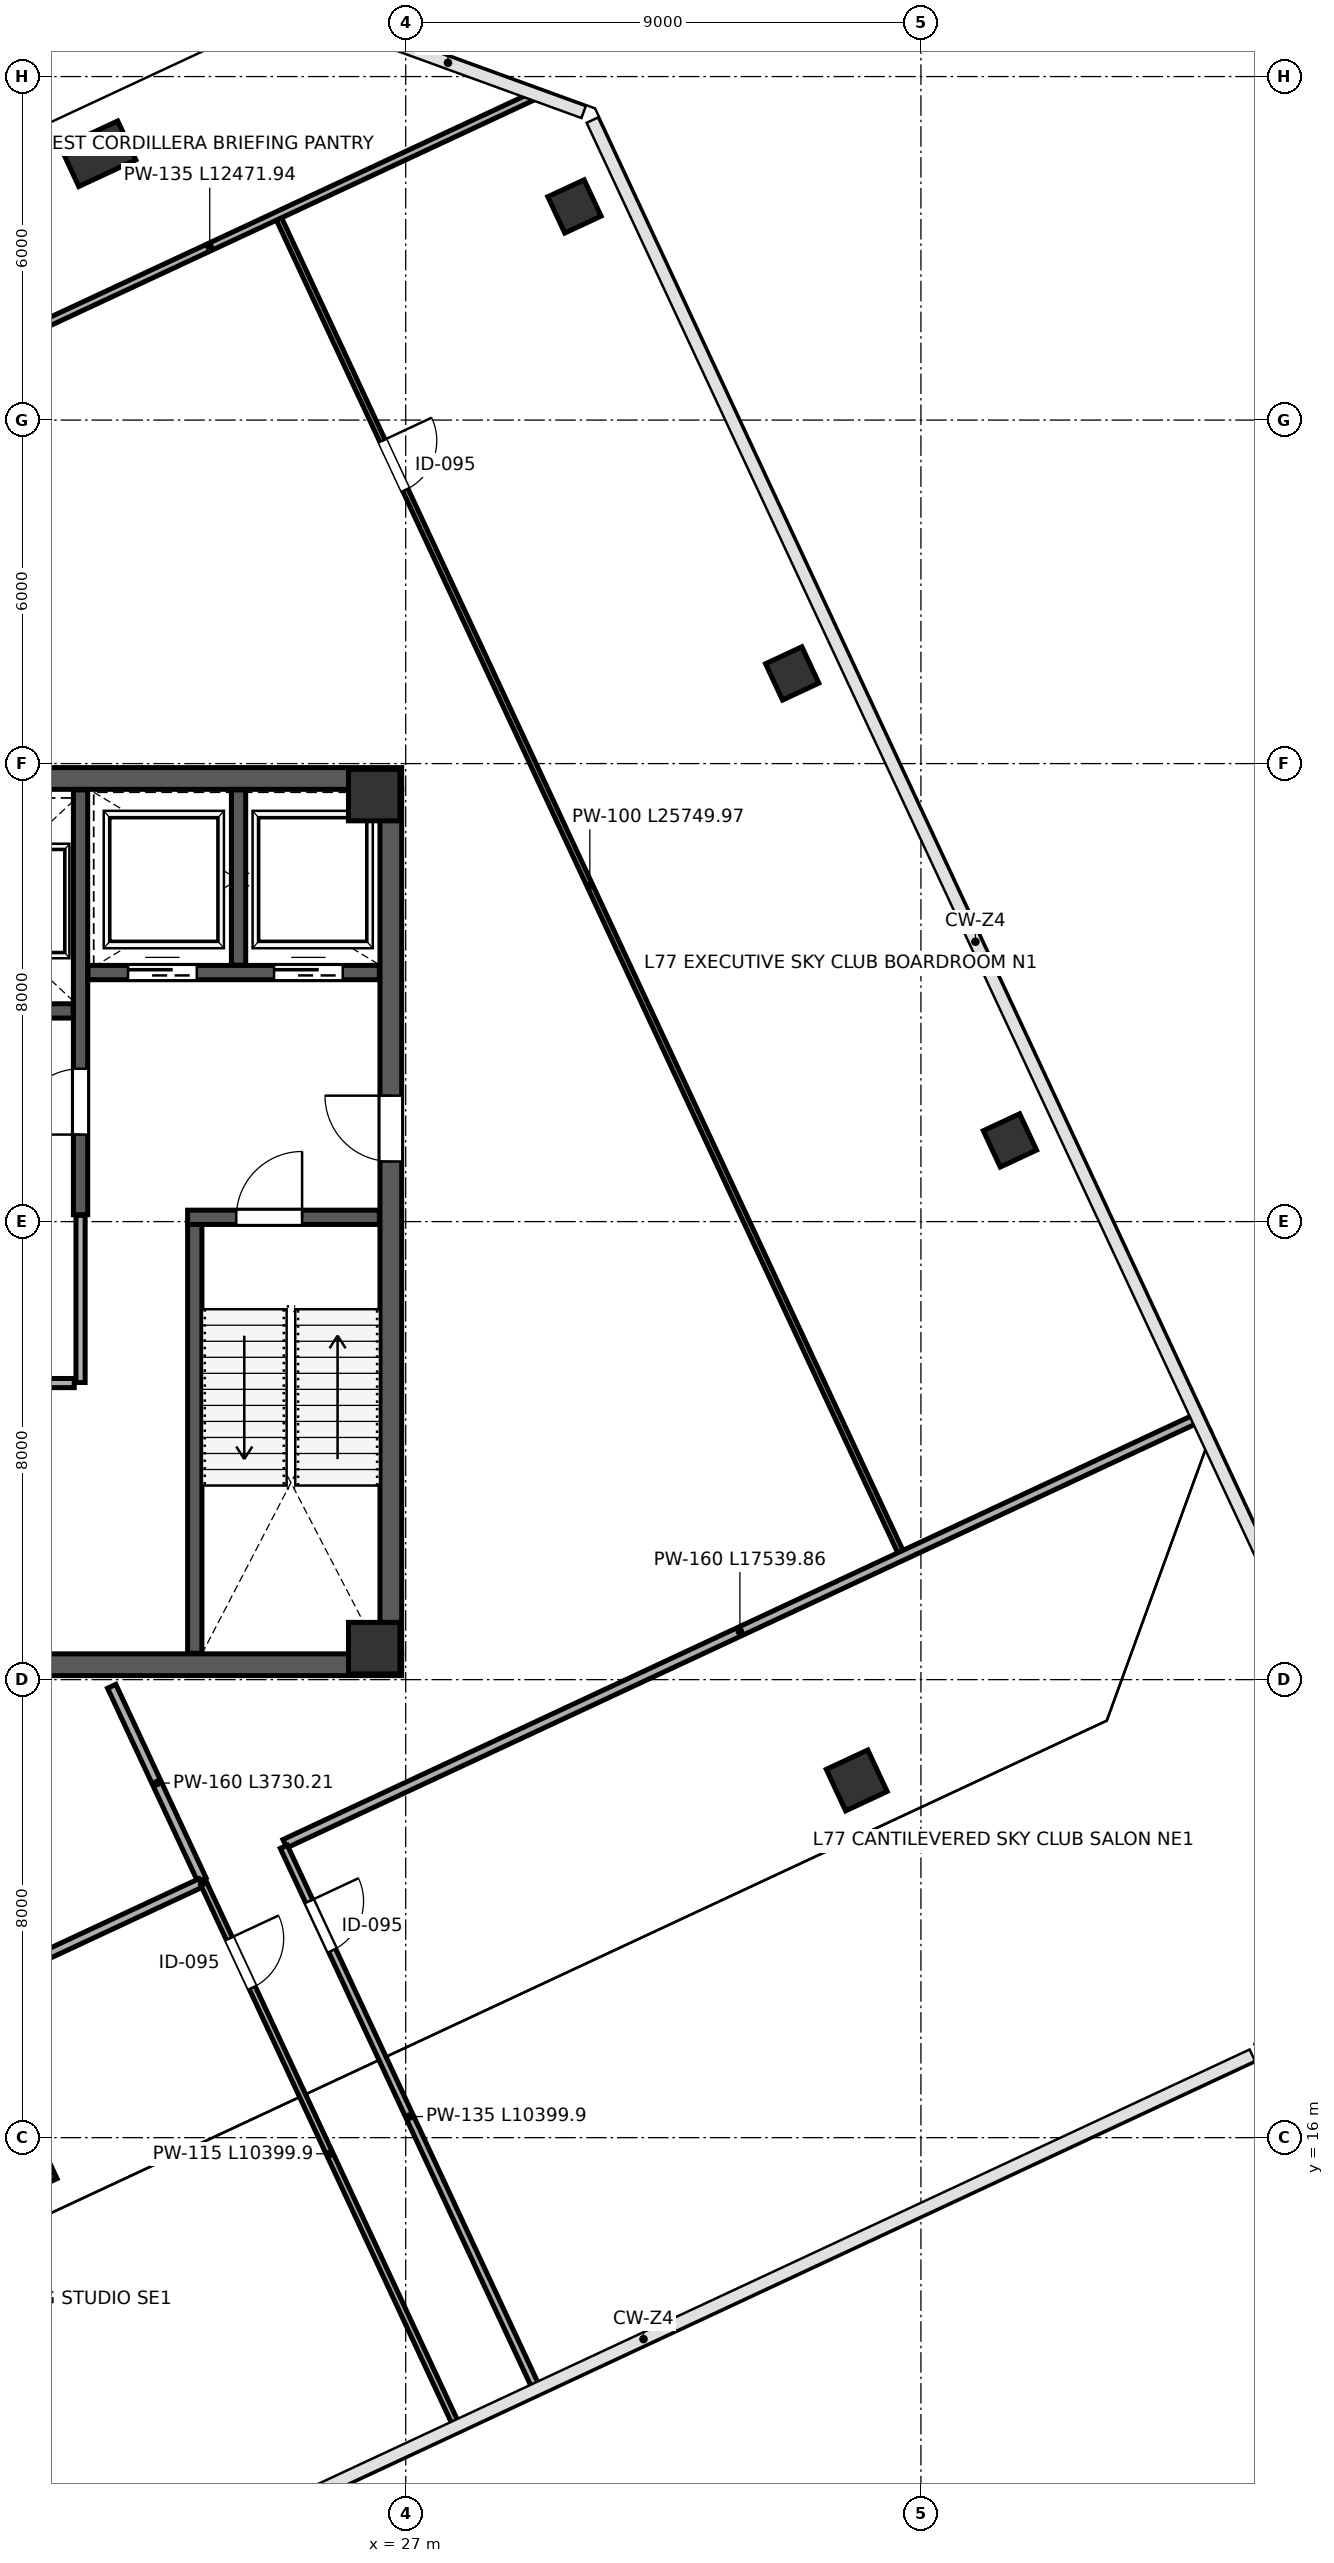
"""IFC4 building model, lengths in metres.
Left out: names, types, materials, properties, quantities, classifications, styles, units other than length and angle.
Written with IfcOpenShell. Run it as: python <this file> out.ifc"""

import sys

from ifc_helpers import new_model, si_unit, direction, frame, frame_2d, origin, origin_2d, place, context, subcontext, project, spatial, rectangle, extrude, source, transform, mapped, element, fill, save


model = new_model("IFC4")
c1 = context("Model", 3, precision=1e-05, world=origin(), true_north=direction((0.0, 1.0)))
c2 = subcontext(c1, "Body", "Model", "MODEL_VIEW")
j1 = project(units=[si_unit("LENGTHUNIT", "METRE"), si_unit("PLANEANGLEUNIT", "RADIAN")], contexts=[c1])
p1 = place(None, origin())
s1 = spatial("IfcSite", under=j1, at=p1, CompositionType="ELEMENT")
p2 = place(p1, origin())
s2 = spatial("IfcBuilding", under=s1, at=p2, CompositionType="ELEMENT")
p3 = place(p2, frame((0.0, 0.0, 340.8)))
s3 = spatial("IfcBuildingStorey", under=s2, at=p3, CompositionType="ELEMENT", Elevation=340.8)
m1 = source(origin(), c2, "Body", "SweptSolid", [
    extrude(rectangle(XDim=0.9, YDim=0.9, at=origin_2d()), origin(), (0.0, 0.0, 1.0), 4.198),
])
for number, where, z_axis, x_axis in (
    (1, (26.45, 24.55, 0.001), (0.0, 0.0, 1.0), (1.0, 0.0, 0.0)),
    (2, (26.45, 39.45, 0.001), (0.0, 0.0, 1.0), (1.0, 0.0, 0.0)),
):
    element("IfcColumn", number, at=place(p3, frame(where, z_axis=z_axis, x_axis=x_axis)), inside=s3, PredefinedType="COLUMN", context=c2, shape_type="MappedRepresentation", body=[
        mapped(m1, transform((0.0, 0.0, 0.0), scale=1.0)),
    ])
m2 = source(origin(), c2, "Body", "SweptSolid", [
    extrude(rectangle(XDim=0.7, YDim=0.7, at=origin_2d()), origin(), (0.0, 0.0, 1.0), 4.198),
])
for number, where, z_axis, x_axis in (
    (3, (29.948, 49.731, 0.001), (0.0, 0.0, 1.0), (-0.423, 0.906, 0.0)),
    (4, (33.751, 41.575, 0.001), (0.0, 0.0, 1.0), (-0.423, 0.906, 0.0)),
    (5, (37.555, 33.418, 0.001), (0.0, 0.0, 1.0), (-0.423, 0.906, 0.0)),
):
    element("IfcColumn", number, at=place(p3, frame(where, z_axis=z_axis, x_axis=x_axis)), inside=s3, PredefinedType="COLUMN", context=c2, shape_type="MappedRepresentation", body=[
        mapped(m2, transform((0.0, 0.0, 0.0), scale=1.0)),
    ])
m3 = source(origin(), c2, "Body", "SweptSolid", [
    extrude(rectangle(XDim=0.8, YDim=0.8, at=origin_2d()), origin(), (0.0, 0.0, 1.0), 4.198),
])
for number, where, z_axis, x_axis in (
    (6, (20.377, 15.478, 0.001), (0.0, 0.0, 1.0), (-0.423, 0.906, 0.0)),
    (7, (34.878, 22.24, 0.001), (0.0, 0.0, 1.0), (-0.423, 0.906, 0.0)),
):
    element("IfcColumn", number, at=place(p3, frame(where, z_axis=z_axis, x_axis=x_axis)), inside=s3, PredefinedType="COLUMN", context=c2, shape_type="MappedRepresentation", body=[
        mapped(m3, transform((0.0, 0.0, 0.0), scale=1.0)),
    ])
m4 = source(origin(), c2, "Body", "SweptSolid", [
    extrude(rectangle(XDim=0.75, YDim=1.1, at=origin_2d()), origin(), (0.0, 0.0, 1.0), 4.198),
])
p4 = place(p3, frame((21.629, 50.652, 0.001), z_axis=(0.0, 0.0, 1.0), x_axis=(-0.422618261741, 0.906307787037, 0.0)))
e8 = element("IfcColumn", 8, at=p4, inside=s3, PredefinedType="PILASTER", context=c2, shape_type="MappedRepresentation", body=[
    mapped(m4, transform((0.0, 0.0, 0.0), scale=1.0)),
])
p5 = place(p3, frame((26.74, 24.45, 0.0), z_axis=(0.0, 0.0, 1.0), x_axis=(0.0, 1.0, 0.0)))
e9 = element("IfcWall", 9, at=p5, inside=s3, PredefinedType="SHEAR", context=c2, shape_type="SweptSolid", body=[
    extrude(rectangle(XDim=15.1, YDim=0.38, at=frame_2d((7.55, 0.0))), origin(), (0.0, 0.0, 1.0), 3.96),
])
p6 = place(p5, frame((8.6, 0.0, 0.0)))
e10 = element("IfcOpeningElement", 10, at=p6, cuts=e9, PredefinedType="OPENING", context=c2, shape_type="SweptSolid", body=[
    extrude(rectangle(XDim=1.15, YDim=2.2, at=frame_2d((0.575, 1.1))), frame((0.0, 0.2, 0.0), z_axis=(0.0, -1.0, 0.0), x_axis=(1.0, 0.0, 0.0)), (0.0, 0.0, 1.0), 0.4),
])
for number, where, z_axis, x_axis in (
    (11, (9.07, 24.26, 0.0), (0.0, 0.0, 1.0), (1.0, 0.0, 0.0)),
    (12, (9.07, 39.74, 0.0), (0.0, 0.0, 1.0), (1.0, 0.0, 0.0)),
):
    element("IfcWall", number, at=place(p3, frame(where, z_axis=z_axis, x_axis=x_axis)), inside=s3, PredefinedType="SHEAR", context=c2, shape_type="SweptSolid", body=[
        extrude(rectangle(XDim=17.86, YDim=0.38, at=frame_2d((8.93, 0.0))), origin(), (0.0, 0.0, 1.0), 3.96),
    ])
p7 = place(p3, frame((23.315, 24.46, 0.0), z_axis=(0.0, 0.0, 1.0), x_axis=(0.0, 1.0, 0.0)))
e13 = element("IfcWall", 13, at=p7, inside=s3, PredefinedType="SHEAR", context=c2, shape_type="SweptSolid", body=[
    extrude(rectangle(XDim=7.49, YDim=0.25, at=frame_2d((3.745, 0.0))), origin(), (0.0, 0.0, 1.0), 3.96),
])
p8 = place(p3, frame((23.19, 32.075, 0.0), z_axis=(0.0, 0.0, 1.0), x_axis=(1.0, 0.0, 0.0)))
e14 = element("IfcWall", 14, at=p8, inside=s3, PredefinedType="SHEAR", context=c2, shape_type="SweptSolid", body=[
    extrude(rectangle(XDim=3.35, YDim=0.25, at=frame_2d((1.675, 0.0))), origin(), (0.0, 0.0, 1.0), 3.96),
])
p9 = place(p8, frame((0.85, 0.0, 0.0)))
e15 = element("IfcOpeningElement", 15, at=p9, cuts=e14, PredefinedType="OPENING", context=c2, shape_type="SweptSolid", body=[
    extrude(rectangle(XDim=1.15, YDim=2.2, at=frame_2d((0.575, 1.1))), frame((0.0, 0.135, 0.0), z_axis=(0.0, -1.0, 0.0), x_axis=(1.0, 0.0, 0.0)), (0.0, 0.0, 1.0), 0.27),
])
p10 = place(p3, frame((21.32, 32.12, 0.0), z_axis=(0.0, 0.0, 1.0), x_axis=(0.0, 1.0, 0.0)))
e16 = element("IfcWall", 16, at=p10, inside=s3, PredefinedType="SHEAR", context=c2, shape_type="SweptSolid", body=[
    extrude(rectangle(XDim=7.42, YDim=0.25, at=frame_2d((3.71, 0.0))), origin(), (0.0, 0.0, 1.0), 3.96),
])
p11 = place(p10, frame((1.4, 0.0, 0.0)))
e17 = element("IfcOpeningElement", 17, at=p11, cuts=e16, PredefinedType="OPENING", context=c2, shape_type="SweptSolid", body=[
    extrude(rectangle(XDim=1.15, YDim=2.2, at=frame_2d((0.575, 1.1))), frame((0.0, 0.135, 0.0), z_axis=(0.0, -1.0, 0.0), x_axis=(1.0, 0.0, 0.0)), (0.0, 0.0, 1.0), 0.27),
])
p12 = place(p3, frame((21.45, 36.35, 0.0), z_axis=(0.0, 0.0, 1.0), x_axis=(1.0, 0.0, 0.0)))
e18 = element("IfcWall", 18, at=p12, inside=s3, PredefinedType="SHEAR", context=c2, shape_type="SweptSolid", body=[
    extrude(rectangle(XDim=5.09, YDim=0.25, at=frame_2d((2.545, 0.0))), origin(), (0.0, 0.0, 1.0), 3.96),
])
p13 = place(p12, frame((0.7, 0.0, 0.0)))
e19 = element("IfcOpeningElement", 19, at=p13, cuts=e18, PredefinedType="OPENING", context=c2, shape_type="SweptSolid", body=[
    extrude(rectangle(XDim=1.2, YDim=2.2, at=frame_2d((0.6, 1.1))), frame((0.0, 0.135, 0.0), z_axis=(0.0, -1.0, 0.0), x_axis=(1.0, 0.0, 0.0)), (0.0, 0.0, 1.0), 0.27),
])
p14 = place(p12, frame((3.25, 0.0, 0.0)))
e20 = element("IfcOpeningElement", 20, at=p14, cuts=e18, PredefinedType="OPENING", context=c2, shape_type="SweptSolid", body=[
    extrude(rectangle(XDim=1.2, YDim=2.2, at=frame_2d((0.6, 1.1))), frame((0.0, 0.135, 0.0), z_axis=(0.0, -1.0, 0.0), x_axis=(1.0, 0.0, 0.0)), (0.0, 0.0, 1.0), 0.27),
])
p15 = place(p3, frame((24.08, 36.48, 0.0), z_axis=(0.0, 0.0, 1.0), x_axis=(0.0, 1.0, 0.0)))
e21 = element("IfcWall", 21, at=p15, inside=s3, PredefinedType="SHEAR", context=c2, shape_type="SweptSolid", body=[
    extrude(rectangle(XDim=3.06, YDim=0.25, at=frame_2d((1.53, 0.0))), origin(), (0.0, 0.0, 1.0), 3.96),
])
p16 = place(p3, frame((17.32, 35.68, 0.0), z_axis=(0.0, 0.0, 1.0), x_axis=(1.0, 0.0, 0.0)))
e22 = element("IfcWall", 22, at=p16, inside=s3, PredefinedType="SHEAR", context=c2, shape_type="SweptSolid", body=[
    extrude(rectangle(XDim=3.87, YDim=0.25, at=frame_2d((1.935, 0.0))), origin(), (0.0, 0.0, 1.0), 3.96),
])
p17 = place(p16, frame((0.45, 0.0, 0.0)))
e23 = element("IfcOpeningElement", 23, at=p17, cuts=e22, PredefinedType="OPENING", context=c2, shape_type="SweptSolid", body=[
    extrude(rectangle(XDim=1.1, YDim=2.2, at=frame_2d((0.55, 1.1))), frame((0.0, 0.135, 0.0), z_axis=(0.0, -1.0, 0.0), x_axis=(1.0, 0.0, 0.0)), (0.0, 0.0, 1.0), 0.27),
])
p18 = place(p16, frame((2.35, 0.0, 0.0)))
e24 = element("IfcOpeningElement", 24, at=p18, cuts=e22, PredefinedType="OPENING", context=c2, shape_type="SweptSolid", body=[
    extrude(rectangle(XDim=1.1, YDim=2.2, at=frame_2d((0.55, 1.1))), frame((0.0, 0.135, 0.0), z_axis=(0.0, -1.0, 0.0), x_axis=(1.0, 0.0, 0.0)), (0.0, 0.0, 1.0), 0.27),
])
p19 = place(p3, frame((12.84, 29.18, 0.0), z_axis=(0.0, 0.0, 1.0), x_axis=(1.0, 0.0, 0.0)))
e25 = element("IfcWall", 25, at=p19, inside=s3, PredefinedType="PARTITIONING", context=c2, shape_type="SweptSolid", body=[
    extrude(rectangle(XDim=8.37, YDim=0.16, at=frame_2d((4.185, 0.0))), origin(), (0.0, 0.0, 1.0), 3.96),
])
p20 = place(p19, frame((2.6, 0.0, 0.0)))
e26 = element("IfcOpeningElement", 26, at=p20, cuts=e25, PredefinedType="OPENING", context=c2, shape_type="SweptSolid", body=[
    extrude(rectangle(XDim=0.9, YDim=2.15, at=frame_2d((0.45, 1.075))), frame((0.0, 0.09, 0.0), z_axis=(0.0, -1.0, 0.0), x_axis=(1.0, 0.0, 0.0)), (0.0, 0.0, 1.0), 0.18),
])
p21 = place(p3, frame((21.32, 29.19, 0.0), z_axis=(0.0, 0.0, 1.0), x_axis=(0.0, 1.0, 0.0)))
e27 = element("IfcWall", 27, at=p21, inside=s3, PredefinedType="PARTITIONING", context=c2, shape_type="SweptSolid", body=[
    extrude(rectangle(XDim=2.92, YDim=0.16, at=frame_2d((1.46, 0.0))), origin(), (0.0, 0.0, 1.0), 3.96),
])
p22 = place(p3, frame((21.864, 23.884, 0.0), z_axis=(0.0, 0.0, 1.0), x_axis=(0.42259522887, -0.906318527085, 0.0)))
e28 = element("IfcWall", 28, at=p22, inside=s3, PredefinedType="PARTITIONING", context=c2, shape_type="SweptSolid", body=[
    extrude(rectangle(XDim=3.73, YDim=0.16, at=frame_2d((1.865, 0.0))), origin(), (0.0, 0.0, 1.0), 3.96),
])
p23 = place(p3, frame((24.775, 49.537, 0.0), z_axis=(0.0, 0.0, 1.0), x_axis=(0.422615543458, -0.906309054588, 0.0)))
e29 = element("IfcWall", 29, at=p23, inside=s3, PredefinedType="PARTITIONING", context=c2, shape_type="SweptSolid", body=[
    extrude(rectangle(XDim=25.75, YDim=0.1, at=frame_2d((12.875, 0.0))), origin(), (0.0, 0.0, 1.0), 3.96),
])
p24 = place(p23, frame((4.3, 0.0, 0.0)))
e30 = element("IfcOpeningElement", 30, at=p24, cuts=e29, PredefinedType="OPENING", context=c2, shape_type="SweptSolid", body=[
    extrude(rectangle(XDim=0.95, YDim=2.15, at=frame_2d((0.475, 1.075))), frame((0.0, 0.06, 0.0), z_axis=(0.0, -1.0, 0.0), x_axis=(1.0, 0.0, 0.0)), (0.0, 0.0, 1.0), 0.12),
])
p25 = place(p3, frame((17.925, 46.387, 0.0), z_axis=(0.0, 0.0, 1.0), x_axis=(0.906304624979, 0.422625042729, 0.0)))
e31 = element("IfcWall", 31, at=p25, inside=s3, PredefinedType="PARTITIONING", context=c2, shape_type="SweptSolid", body=[
    extrude(rectangle(XDim=12.472, YDim=0.135, at=frame_2d((6.236, 0.0))), origin(), (0.0, 0.0, 1.0), 3.96),
])
p26 = place(p3, frame((24.89, 21.135, 0.0), z_axis=(0.0, 0.0, 1.0), x_axis=(0.906308982529, 0.42261569799, 0.0)))
e32 = element("IfcWall", 32, at=p26, inside=s3, PredefinedType="PARTITIONING", context=c2, shape_type="SweptSolid", body=[
    extrude(rectangle(XDim=17.54, YDim=0.16, at=frame_2d((8.77, 0.0))), origin(), (0.0, 0.0, 1.0), 3.96),
])
p27 = place(p3, frame((12.654, 15.429, 0.0), z_axis=(0.0, 0.0, 1.0), x_axis=(0.906316447934, 0.42259968789, 0.0)))
e33 = element("IfcWall", 33, at=p27, inside=s3, PredefinedType="PARTITIONING", context=c2, shape_type="SweptSolid", body=[
    extrude(rectangle(XDim=11.88, YDim=0.16, at=frame_2d((5.94, 0.0))), origin(), (0.0, 0.0, 1.0), 3.96),
])
p28 = place(p3, frame((24.87, 21.081, 0.0), z_axis=(0.0, 0.0, 1.0), x_axis=(0.422623279804, -0.906305447058, 0.0)))
e34 = element("IfcWall", 34, at=p28, inside=s3, PredefinedType="PARTITIONING", context=c2, shape_type="SweptSolid", body=[
    extrude(rectangle(XDim=10.4, YDim=0.135, at=frame_2d((5.2, 0.0))), origin(), (0.0, 0.0, 1.0), 3.252),
])
p29 = place(p28, frame((1.05, 0.0, 0.0)))
e35 = element("IfcOpeningElement", 35, at=p29, cuts=e34, PredefinedType="OPENING", context=c2, shape_type="SweptSolid", body=[
    extrude(rectangle(XDim=0.95, YDim=2.15, at=frame_2d((0.475, 1.075))), frame((0.0, 0.078, 0.0), z_axis=(0.0, -1.0, 0.0), x_axis=(1.0, 0.0, 0.0)), (0.0, 0.0, 1.0), 0.155),
])
p30 = place(p3, frame((23.475, 20.43, 0.0), z_axis=(0.0, 0.0, 1.0), x_axis=(0.422603997267, -0.906314438533, 0.0)))
e36 = element("IfcWall", 36, at=p30, inside=s3, PredefinedType="PARTITIONING", context=c2, shape_type="SweptSolid", body=[
    extrude(rectangle(XDim=10.4, YDim=0.115, at=frame_2d((5.2, 0.0))), origin(), (0.0, 0.0, 1.0), 3.252),
])
p31 = place(p30, frame((1.05, 0.0, 0.0)))
e37 = element("IfcOpeningElement", 37, at=p31, cuts=e36, PredefinedType="OPENING", context=c2, shape_type="SweptSolid", body=[
    extrude(rectangle(XDim=0.95, YDim=2.15, at=frame_2d((0.475, 1.075))), frame((0.0, 0.067, 0.0), z_axis=(0.0, -1.0, 0.0), x_axis=(1.0, 0.0, 0.0)), (0.0, 0.0, 1.0), 0.135),
])
m5 = source(origin(), c2, "Body", "SweptSolid", [
    extrude(rectangle(XDim=1.15, YDim=2.2, at=frame_2d((0.575, 1.1))), frame((0.0, 0.025, 0.0), z_axis=(0.0, -1.0, 0.0), x_axis=(1.0, 0.0, 0.0)), (0.0, 0.0, 1.0), 0.05),
])
p32 = place(p11, origin())
e38 = element("IfcDoor", 38, at=p32, inside=s3, OperationType="SINGLE_SWING_LEFT", PredefinedType="DOOR", context=c2, shape_type="MappedRepresentation", body=[
    mapped(m5, transform((0.0, 0.0, 0.0), scale=1.0)),
])
fill(e17, e38)
m6 = source(origin(), c2, "Body", "SweptSolid", [
    extrude(rectangle(XDim=1.15, YDim=2.2, at=frame_2d((0.575, 1.1))), frame((0.0, 0.025, 0.0), z_axis=(0.0, -1.0, 0.0), x_axis=(1.0, 0.0, 0.0)), (0.0, 0.0, 1.0), 0.05),
])
p33 = place(p9, origin())
e39 = element("IfcDoor", 39, at=p33, inside=s3, OperationType="SINGLE_SWING_RIGHT", PredefinedType="DOOR", context=c2, shape_type="MappedRepresentation", body=[
    mapped(m6, transform((0.0, 0.0, 0.0), scale=1.0)),
])
fill(e15, e39)
p34 = place(p6, origin())
e40 = element("IfcDoor", 40, at=p34, inside=s3, OperationType="SINGLE_SWING_RIGHT", PredefinedType="DOOR", context=c2, shape_type="MappedRepresentation", body=[
    mapped(m5, transform((0.0, 0.0, 0.0), scale=1.0)),
])
fill(e10, e40)
m7 = source(origin(), c2, "Body", "SweptSolid", [
    extrude(rectangle(XDim=1.2, YDim=2.2, at=frame_2d((0.6, 1.1))), frame((0.0, 0.025, 0.0), z_axis=(0.0, -1.0, 0.0), x_axis=(1.0, 0.0, 0.0)), (0.0, 0.0, 1.0), 0.05),
])
p35 = place(p13, origin())
e41 = element("IfcDoor", 41, at=p35, inside=s3, OperationType="SLIDING_TO_LEFT", PredefinedType="DOOR", context=c2, shape_type="MappedRepresentation", body=[
    mapped(m7, transform((0.0, 0.0, 0.0), scale=1.0)),
])
fill(e19, e41)
p36 = place(p14, origin())
e42 = element("IfcDoor", 42, at=p36, inside=s3, OperationType="SLIDING_TO_RIGHT", PredefinedType="DOOR", context=c2, shape_type="MappedRepresentation", body=[
    mapped(m7, transform((0.0, 0.0, 0.0), scale=1.0)),
])
fill(e20, e42)
m8 = source(origin(), c2, "Body", "SweptSolid", [
    extrude(rectangle(XDim=0.95, YDim=2.15, at=frame_2d((0.475, 1.075))), frame((0.0, 0.025, 0.0), z_axis=(0.0, -1.0, 0.0), x_axis=(1.0, 0.0, 0.0)), (0.0, 0.0, 1.0), 0.05),
])
p37 = place(p24, origin())
e43 = element("IfcDoor", 43, at=p37, inside=s3, OperationType="SINGLE_SWING_LEFT", PredefinedType="DOOR", context=c2, shape_type="MappedRepresentation", body=[
    mapped(m8, transform((0.0, 0.0, 0.0), scale=1.0)),
])
fill(e30, e43)
p38 = place(p29, origin())
e44 = element("IfcDoor", 44, at=p38, inside=s3, OperationType="SINGLE_SWING_LEFT", PredefinedType="DOOR", context=c2, shape_type="MappedRepresentation", body=[
    mapped(m8, transform((0.0, 0.0, 0.0), scale=1.0)),
])
fill(e35, e44)
p39 = place(p31, origin())
e45 = element("IfcDoor", 45, at=p39, inside=s3, OperationType="SINGLE_SWING_LEFT", PredefinedType="DOOR", context=c2, shape_type="MappedRepresentation", body=[
    mapped(m8, transform((0.0, 0.0, 0.0), scale=1.0)),
])
fill(e37, e45)
save(model, sys.argv[1])
